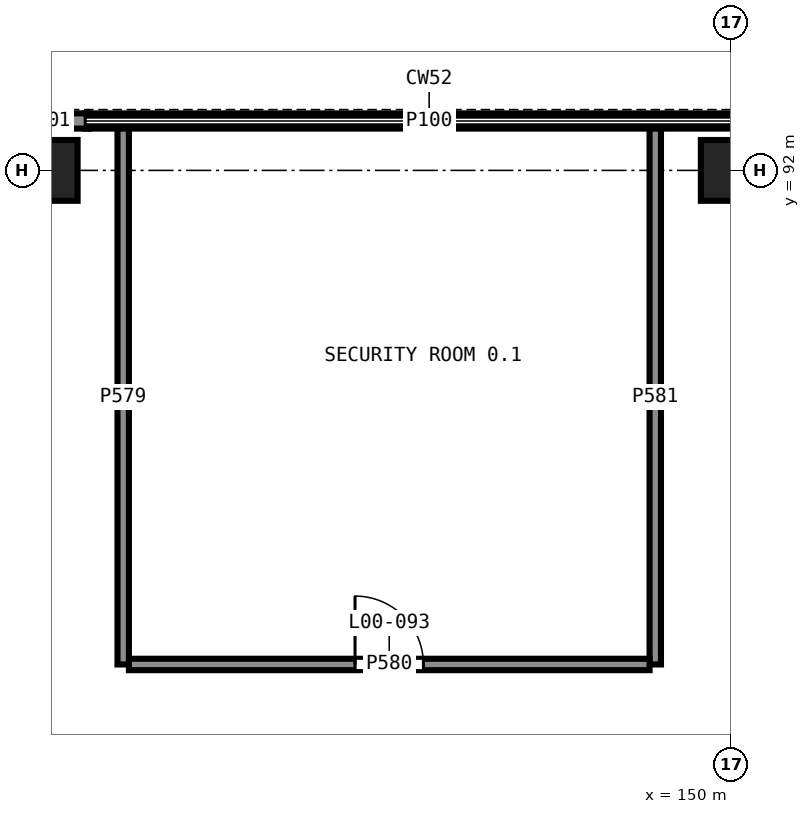
"""IFC4 building model, lengths in metres.
Left out: names, types, materials, properties, quantities, classifications, styles, units other than length and angle.
Written with IfcOpenShell. Run it as: python <this file> out.ifc"""

import sys

from ifc_helpers import new_model, si_unit, direction, frame, frame_2d, origin, origin_2d, place, context, subcontext, project, spatial, rectangle, extrude, element, fill, save


model = new_model("IFC4")
c1 = context("Model", 3, precision=1e-05, world=origin(), true_north=direction((0.0, 1.0)))
c2 = subcontext(c1, "Body", "Model", "MODEL_VIEW")
j1 = project(units=[si_unit("LENGTHUNIT", "METRE"), si_unit("PLANEANGLEUNIT", "RADIAN")], contexts=[c1])
p1 = place(None, origin())
s1 = spatial("IfcSite", under=j1, at=p1, CompositionType="ELEMENT")
p2 = place(p1, origin())
s2 = spatial("IfcBuilding", under=s1, at=p2, CompositionType="ELEMENT")
p3 = place(p2, origin())
s3 = spatial("IfcBuildingStorey", under=s2, at=p3, CompositionType="ELEMENT", Elevation=0.0)
for number, where, z_axis, x_axis in (
    (1, (141.0, 92.0, 0.0), (0.0, 0.0, 1.0), (1.0, 0.0, 0.0)),
    (2, (150.0, 92.0, 0.0), (0.0, 0.0, 1.0), (1.0, 0.0, 0.0)),
):
    element("IfcColumn", number, at=place(p3, frame(where, z_axis=z_axis, x_axis=x_axis)), inside=s3, PredefinedType="COLUMN", context=c2, shape_type="SweptSolid", body=[
        extrude(rectangle(XDim=0.8, YDim=0.8, at=origin_2d()), origin(), (0.0, 0.0, 1.0), 5.5),
    ])
p4 = place(p3, frame((150.55, 92.65, 0.0), z_axis=(0.0, 0.0, 1.0), x_axis=(-1.0, 0.0, 0.0)))
e3 = element("IfcWall", 3, at=p4, inside=s3, PredefinedType="SOLIDWALL", context=c2, shape_type="SweptSolid", body=[
    extrude(rectangle(XDim=9.05, YDim=0.2, at=frame_2d((4.525, 0.0))), origin(), (0.0, 0.0, 1.0), 1.2),
])
p5 = place(p3, frame((141.55, 92.65, 0.0), z_axis=(0.0, 0.0, 1.0), x_axis=(-1.0, 0.0, 0.0)))
e4 = element("IfcWall", 4, at=p5, inside=s3, PredefinedType="SOLIDWALL", context=c2, shape_type="SweptSolid", body=[
    extrude(rectangle(XDim=1.1, YDim=0.2, at=frame_2d((0.55, 0.0))), origin(), (0.0, 0.0, 1.0), 5.25),
])
p6 = place(p3, frame((142.0, 85.5, 0.0), z_axis=(0.0, 0.0, 1.0), x_axis=(0.0, 1.0, 0.0)))
e5 = element("IfcWall", 5, at=p6, inside=s3, PredefinedType="PARTITIONING", context=c2, shape_type="SweptSolid", body=[
    extrude(rectangle(XDim=7.05, YDim=0.15, at=frame_2d((3.525, 0.0))), origin(), (0.0, 0.0, 1.0), 5.25),
])
p7 = place(p3, frame((142.075, 85.5, 0.0), z_axis=(0.0, 0.0, 1.0), x_axis=(1.0, 0.0, 0.0)))
e6 = element("IfcWall", 6, at=p7, inside=s3, PredefinedType="PARTITIONING", context=c2, shape_type="SweptSolid", body=[
    extrude(rectangle(XDim=6.85, YDim=0.15, at=frame_2d((3.425, 0.0))), origin(), (0.0, 0.0, 1.0), 5.25),
])
p8 = place(p7, frame((2.975, 0.0, 0.0)))
e7 = element("IfcOpeningElement", 7, at=p8, cuts=e6, PredefinedType="OPENING", context=c2, shape_type="SweptSolid", body=[
    extrude(rectangle(XDim=0.9, YDim=2.1, at=frame_2d((0.45, 1.05))), frame((0.0, 0.085, 0.0), z_axis=(0.0, -1.0, 0.0), x_axis=(1.0, 0.0, 0.0)), (0.0, 0.0, 1.0), 0.17),
])
p9 = place(p3, frame((149.0, 85.5, 0.0), z_axis=(0.0, 0.0, 1.0), x_axis=(0.0, 1.0, 0.0)))
e8 = element("IfcWall", 8, at=p9, inside=s3, PredefinedType="PARTITIONING", context=c2, shape_type="SweptSolid", body=[
    extrude(rectangle(XDim=7.05, YDim=0.15, at=frame_2d((3.525, 0.0))), origin(), (0.0, 0.0, 1.0), 5.25),
])
p10 = place(p8, origin())
e9 = element("IfcDoor", 9, at=p10, inside=s3, OperationType="SINGLE_SWING_RIGHT", PredefinedType="DOOR", context=c2, shape_type="SweptSolid", body=[
    extrude(rectangle(XDim=0.9, YDim=2.1, at=frame_2d((0.45, 1.05))), frame((0.0, 0.025, 0.0), z_axis=(0.0, -1.0, 0.0), x_axis=(1.0, 0.0, 0.0)), (0.0, 0.0, 1.0), 0.05),
])
fill(e7, e9)
save(model, sys.argv[1])
